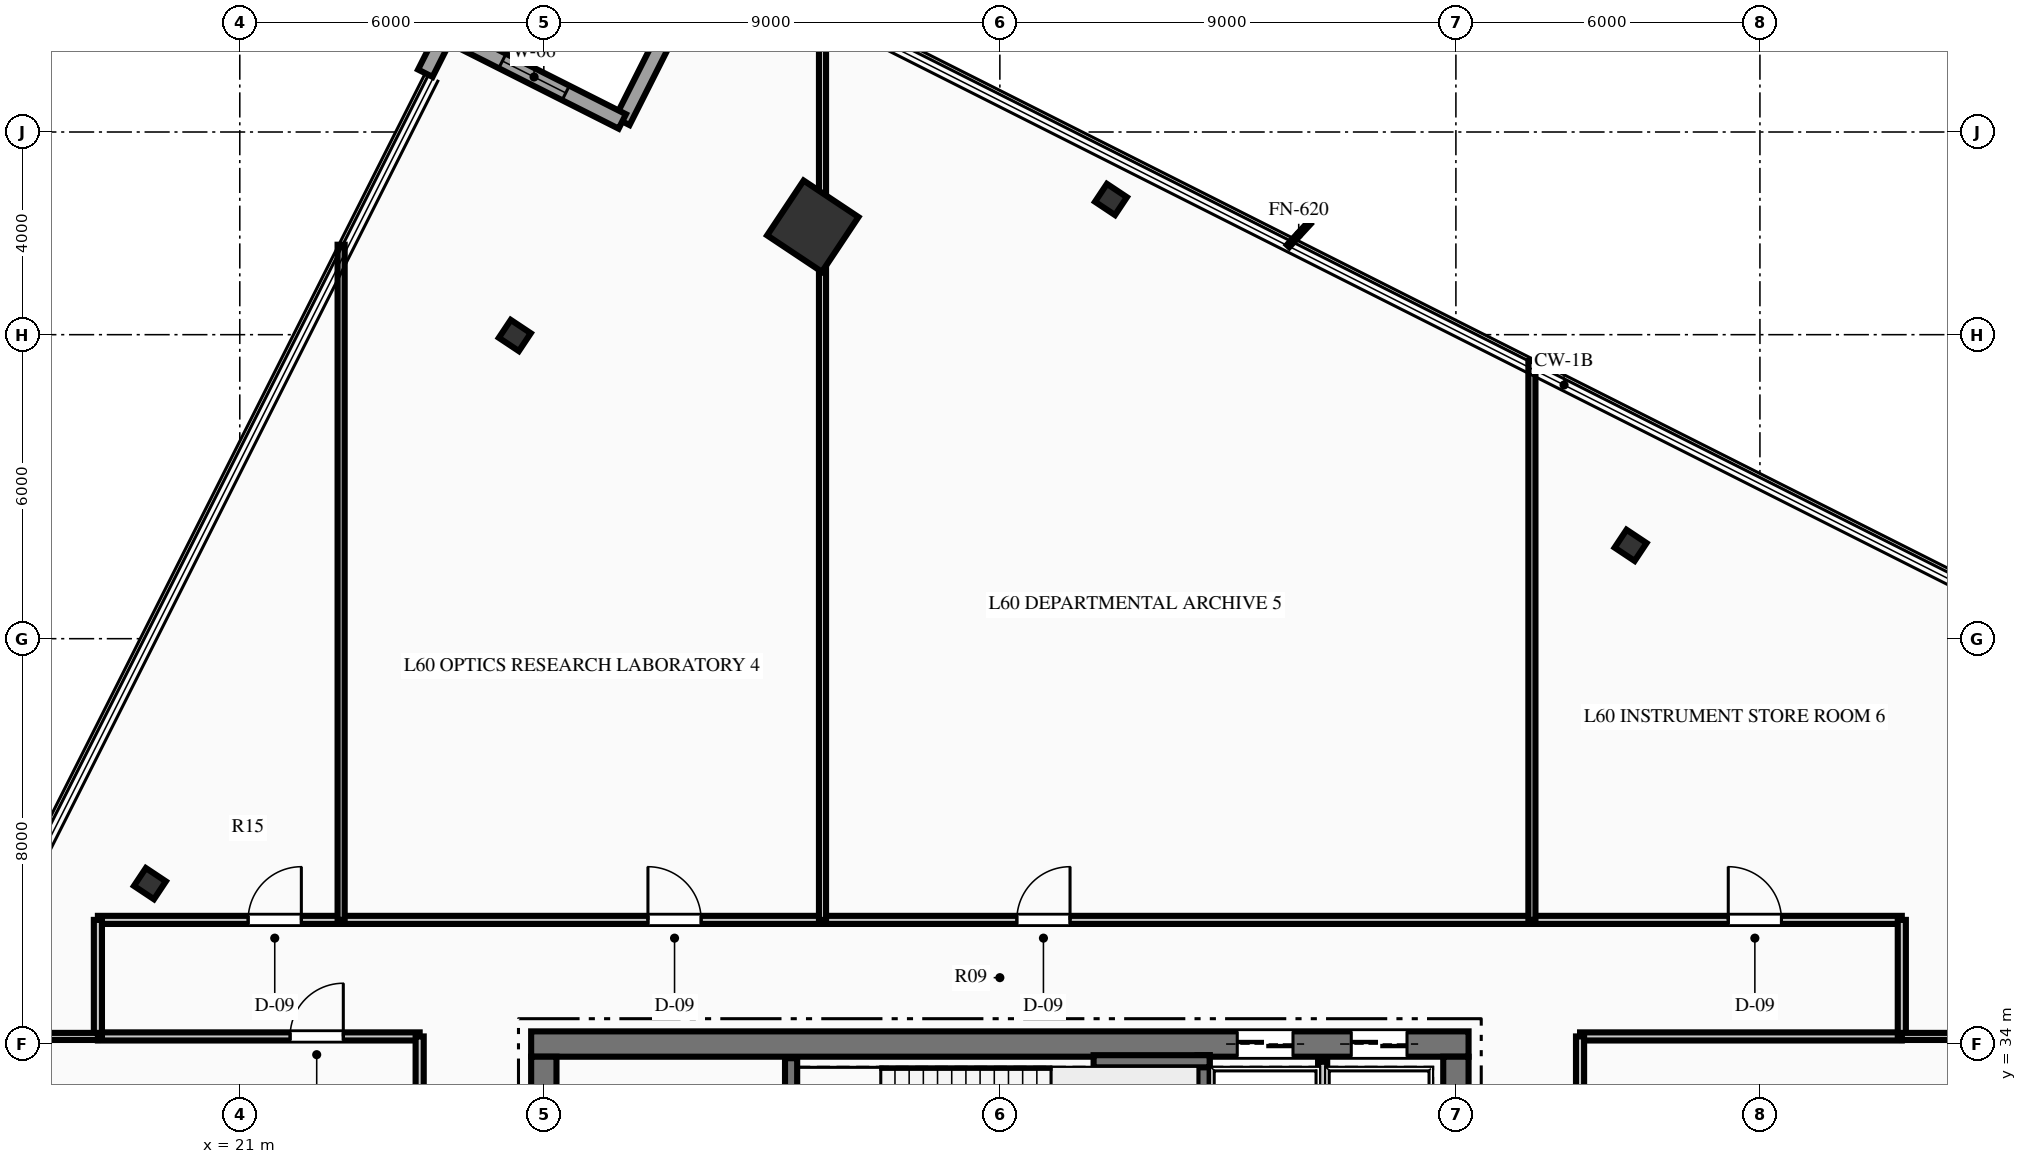
"""IFC4 building model, lengths in metres.
Left out: names, types, materials, properties, quantities, classifications, styles, units other than length and angle.
Written with IfcOpenShell. Run it as: python <this file> out.ifc"""

import sys

from ifc_helpers import new_model, si_unit, direction, frame, frame_2d, origin, origin_2d, place, context, subcontext, project, spatial, rectangle, hollow_rectangle, i_section, extrude, element, fill, save


model = new_model("IFC4")
c1 = context("Model", 3, precision=1e-05, world=origin(), true_north=direction((0.0, 1.0)))
c2 = subcontext(c1, "Body", "Model", "MODEL_VIEW")
j1 = project(units=[si_unit("LENGTHUNIT", "METRE"), si_unit("PLANEANGLEUNIT", "RADIAN")], contexts=[c1])
p1 = place(None, origin())
s1 = spatial("IfcSite", under=j1, at=p1, CompositionType="ELEMENT")
p2 = place(p1, origin())
s2 = spatial("IfcBuilding", under=s1, at=p2, CompositionType="ELEMENT")
p3 = place(p2, frame((0.0, 0.0, 239.7)))
s3 = spatial("IfcBuildingStorey", under=s2, at=p3, CompositionType="ELEMENT", Elevation=239.7)
p4 = place(p3, frame((26.75, 34.0, 0.0), z_axis=(0.0, 0.0, 1.0), x_axis=(1.0, 0.0, 0.0)))
e1 = element("IfcWall", 1, at=p4, inside=s3, PredefinedType="SHEAR", context=c2, shape_type="SweptSolid", body=[
    extrude(rectangle(XDim=18.5, YDim=0.5, at=frame_2d((9.25, 0.0))), origin(), (0.0, 0.0, 1.0), 4.5),
])
p5 = place(p4, frame((13.935, 0.0, 0.0)))
e2 = element("IfcOpeningElement", 2, at=p5, cuts=e1, PredefinedType="OPENING", context=c2, shape_type="SweptSolid", body=[
    extrude(rectangle(XDim=1.1, YDim=2.15, at=frame_2d((0.55, 1.075))), frame((0.0, 0.26, 0.0), z_axis=(0.0, -1.0, 0.0), x_axis=(1.0, 0.0, 0.0)), (0.0, 0.0, 1.0), 0.52),
])
p6 = place(p4, frame((16.185, 0.0, 0.0)))
e3 = element("IfcOpeningElement", 3, at=p6, cuts=e1, PredefinedType="OPENING", context=c2, shape_type="SweptSolid", body=[
    extrude(rectangle(XDim=1.1, YDim=2.15, at=frame_2d((0.55, 1.075))), frame((0.0, 0.26, 0.0), z_axis=(0.0, -1.0, 0.0), x_axis=(1.0, 0.0, 0.0)), (0.0, 0.0, 1.0), 0.52),
])
p7 = place(p3, frame((27.0, 18.25, 0.0), z_axis=(0.0, 0.0, 1.0), x_axis=(0.0, 1.0, 0.0)))
e4 = element("IfcWall", 4, at=p7, inside=s3, PredefinedType="SHEAR", context=c2, shape_type="SweptSolid", body=[
    extrude(rectangle(XDim=15.5, YDim=0.5, at=frame_2d((7.75, 0.0))), origin(), (0.0, 0.0, 1.0), 4.5),
])
p8 = place(p7, frame((9.99, 0.0, 0.0)))
e5 = element("IfcOpeningElement", 5, at=p8, cuts=e4, PredefinedType="OPENING", context=c2, shape_type="SweptSolid", body=[
    extrude(rectangle(XDim=1.4, YDim=2.2, at=frame_2d((0.7, 1.1))), frame((0.0, 0.26, 0.0), z_axis=(0.0, -1.0, 0.0), x_axis=(1.0, 0.0, 0.0)), (0.0, 0.0, 1.0), 0.52),
])
p9 = place(p3, frame((45.0, 18.25, 0.0), z_axis=(0.0, 0.0, 1.0), x_axis=(0.0, 1.0, 0.0)))
e6 = element("IfcWall", 6, at=p9, inside=s3, PredefinedType="SHEAR", context=c2, shape_type="SweptSolid", body=[
    extrude(rectangle(XDim=15.5, YDim=0.5, at=frame_2d((7.75, 0.0))), origin(), (0.0, 0.0, 1.0), 4.5),
])
p10 = place(p9, frame((9.99, 0.0, 0.0)))
e7 = element("IfcOpeningElement", 7, at=p10, cuts=e6, PredefinedType="OPENING", context=c2, shape_type="SweptSolid", body=[
    extrude(rectangle(XDim=1.4, YDim=2.2, at=frame_2d((0.7, 1.1))), frame((0.0, 0.26, 0.0), z_axis=(0.0, -1.0, 0.0), x_axis=(1.0, 0.0, 0.0)), (0.0, 0.0, 1.0), 0.52),
])
p11 = place(p3, frame((31.88, 29.93, 0.0), z_axis=(0.0, 0.0, 1.0), x_axis=(0.0, 1.0, 0.0)))
e8 = element("IfcWall", 8, at=p11, inside=s3, PredefinedType="SHEAR", context=c2, shape_type="SweptSolid", body=[
    extrude(rectangle(XDim=3.79, YDim=0.24, at=frame_2d((1.895, 0.0))), origin(), (0.0, 0.0, 1.0), 4.5),
])
p12 = place(p3, frame((40.02, 29.93, 0.0), z_axis=(0.0, 0.0, 1.0), x_axis=(0.0, 1.0, 0.0)))
e9 = element("IfcWall", 9, at=p12, inside=s3, PredefinedType="SHEAR", context=c2, shape_type="SweptSolid", body=[
    extrude(rectangle(XDim=3.85, YDim=0.24, at=frame_2d((1.925, 0.0))), origin(), (0.0, 0.0, 1.0), 4.5),
])
p13 = place(p3, frame((37.85, 33.66, 0.0), z_axis=(0.0, 0.0, 1.0), x_axis=(1.0, 0.0, 0.0)))
e10 = element("IfcWall", 10, at=p13, inside=s3, PredefinedType="SHEAR", context=c2, shape_type="SweptSolid", body=[
    extrude(rectangle(XDim=2.29, YDim=0.24, at=frame_2d((1.145, 0.0))), origin(), (0.0, 0.0, 1.0), 4.5),
])
p14 = place(p3, frame((32.308, 50.141, 0.0), z_axis=(0.0, 0.0, 1.0), x_axis=(0.554118199338, 0.832437998389, 0.0)))
e11 = element("IfcColumn", 11, at=p14, inside=s3, PredefinedType="COLUMN", context=c2, shape_type="SweptSolid", body=[
    extrude(hollow_rectangle(XDim=1.3, YDim=1.3, WallThickness=0.06, at=origin_2d()), origin(), (0.0, 0.0, 1.0), 4.5),
])
for number, where, z_axis, x_axis in (
    (12, (48.448, 43.842, 0.0), (0.0, 0.0, 1.0), (0.554, 0.832, 0.0)),
    (13, (38.193, 50.668, 0.0), (0.0, 0.0, 1.0), (0.554, 0.832, 0.0)),
    (14, (26.428, 47.984, 0.0), (0.0, 0.0, 1.0), (0.554, 0.832, 0.0)),
    (15, (19.226, 37.166, 0.0), (0.0, 0.0, 1.0), (0.554, 0.832, 0.0)),
):
    element("IfcColumn", number, at=place(p3, frame(where, z_axis=z_axis, x_axis=x_axis)), inside=s3, PredefinedType="COLUMN", context=c2, shape_type="SweptSolid", body=[
        extrude(i_section(OverallWidth=0.424, OverallDepth=0.474, WebThickness=0.048, FlangeThickness=0.077, at=origin_2d()), origin(), (0.0, 0.0, 1.0), 4.5),
    ])
p15 = place(p3, frame((28.549, 52.208, 0.0), z_axis=(0.0, 0.0, 1.0), x_axis=(0.450090857711, 0.892982765682, 0.0)))
e16 = element("IfcWall", 16, at=p15, inside=s3, PredefinedType="STANDARD", context=c2, shape_type="SweptSolid", body=[
    extrude(rectangle(XDim=3.9, YDim=0.32, at=frame_2d((1.95, 0.0))), origin(), (0.0, 0.0, 1.0), 4.1),
])
p16 = place(p3, frame((25.066, 53.964, 0.0), z_axis=(0.0, 0.0, 1.0), x_axis=(0.892982765682, -0.450090857711, 0.0)))
e17 = element("IfcWall", 17, at=p16, inside=s3, PredefinedType="STANDARD", context=c2, shape_type="SweptSolid", body=[
    extrude(rectangle(XDim=3.9, YDim=0.32, at=frame_2d((1.95, 0.0))), origin(), (0.0, 0.0, 1.0), 4.1),
])
p17 = place(p16, frame((1.25, 0.0, 0.85)))
e18 = element("IfcOpeningElement", 18, at=p17, cuts=e17, PredefinedType="OPENING", context=c2, shape_type="SweptSolid", body=[
    extrude(rectangle(XDim=1.4, YDim=2.0, at=frame_2d((0.7, 1.0))), frame((0.0, 0.17, 0.0), z_axis=(0.0, -1.0, 0.0), x_axis=(1.0, 0.0, 0.0)), (0.0, 0.0, 1.0), 0.34),
])
p18 = place(p3, frame((24.661, 53.16, 0.0), z_axis=(0.0, 0.0, 1.0), x_axis=(0.450032551421, 0.893012151464, 0.0)))
e19 = element("IfcWall", 19, at=p18, inside=s3, PredefinedType="STANDARD", context=c2, shape_type="SweptSolid", body=[
    extrude(rectangle(XDim=0.9, YDim=0.32, at=frame_2d((0.45, 0.0))), origin(), (0.0, 0.0, 1.0), 4.1),
])
p19 = place(p3, frame((42.37, 29.9, 0.0), z_axis=(0.0, 0.0, 1.0), x_axis=(0.0, 1.0, 0.0)))
e20 = element("IfcWall", 20, at=p19, inside=s3, PredefinedType="PARTITIONING", context=c2, shape_type="SweptSolid", body=[
    extrude(rectangle(XDim=3.75, YDim=0.18, at=frame_2d((1.875, 0.0))), origin(), (0.0, 0.0, 1.0), 4.1),
])
p20 = place(p3, frame((18.2, 36.45, 0.0), z_axis=(0.0, 0.0, 1.0), x_axis=(1.0, 0.0, 0.0)))
e21 = element("IfcWall", 21, at=p20, inside=s3, PredefinedType="PARTITIONING", context=c2, shape_type="SweptSolid", body=[
    extrude(rectangle(XDim=35.6, YDim=0.16, at=frame_2d((17.8, 0.0))), origin(), (0.0, 0.0, 1.0), 2.595),
])
p21 = place(p20, frame((2.965, 0.0, 0.0)))
e22 = element("IfcOpeningElement", 22, at=p21, cuts=e21, PredefinedType="OPENING", context=c2, shape_type="SweptSolid", body=[
    extrude(rectangle(XDim=1.05, YDim=2.15, at=frame_2d((0.525, 1.075))), frame((0.0, 0.09, 0.0), z_axis=(0.0, -1.0, 0.0), x_axis=(1.0, 0.0, 0.0)), (0.0, 0.0, 1.0), 0.18),
])
p22 = place(p20, frame((10.855, 0.0, 0.0)))
e23 = element("IfcOpeningElement", 23, at=p22, cuts=e21, PredefinedType="OPENING", context=c2, shape_type="SweptSolid", body=[
    extrude(rectangle(XDim=1.05, YDim=2.15, at=frame_2d((0.525, 1.075))), frame((0.0, 0.09, 0.0), z_axis=(0.0, -1.0, 0.0), x_axis=(1.0, 0.0, 0.0)), (0.0, 0.0, 1.0), 0.18),
])
p23 = place(p20, frame((18.135, 0.0, 0.0)))
e24 = element("IfcOpeningElement", 24, at=p23, cuts=e21, PredefinedType="OPENING", context=c2, shape_type="SweptSolid", body=[
    extrude(rectangle(XDim=1.05, YDim=2.15, at=frame_2d((0.525, 1.075))), frame((0.0, 0.09, 0.0), z_axis=(0.0, -1.0, 0.0), x_axis=(1.0, 0.0, 0.0)), (0.0, 0.0, 1.0), 0.18),
])
p24 = place(p20, frame((32.175, 0.0, 0.0)))
e25 = element("IfcOpeningElement", 25, at=p24, cuts=e21, PredefinedType="OPENING", context=c2, shape_type="SweptSolid", body=[
    extrude(rectangle(XDim=1.05, YDim=2.15, at=frame_2d((0.525, 1.075))), frame((0.0, 0.09, 0.0), z_axis=(0.0, -1.0, 0.0), x_axis=(1.0, 0.0, 0.0)), (0.0, 0.0, 1.0), 0.18),
])
p25 = place(p3, frame((18.2, 34.15, 0.0), z_axis=(0.0, 0.0, 1.0), x_axis=(1.0, 0.0, 0.0)))
e26 = element("IfcWall", 26, at=p25, inside=s3, PredefinedType="PARTITIONING", context=c2, shape_type="SweptSolid", body=[
    extrude(rectangle(XDim=6.35, YDim=0.16, at=frame_2d((3.175, 0.0))), origin(), (0.0, 0.0, 1.0), 4.1),
])
p26 = place(p25, frame((3.793, 0.0, 0.0)))
e27 = element("IfcOpeningElement", 27, at=p26, cuts=e26, PredefinedType="OPENING", context=c2, shape_type="SweptSolid", body=[
    extrude(rectangle(XDim=1.05, YDim=2.15, at=frame_2d((0.525, 1.075))), frame((0.0, 0.09, 0.0), z_axis=(0.0, -1.0, 0.0), x_axis=(1.0, 0.0, 0.0)), (0.0, 0.0, 1.0), 0.18),
])
p27 = place(p3, frame((47.45, 34.15, 0.0), z_axis=(0.0, 0.0, 1.0), x_axis=(1.0, 0.0, 0.0)))
e28 = element("IfcWall", 28, at=p27, inside=s3, PredefinedType="PARTITIONING", context=c2, shape_type="SweptSolid", body=[
    extrude(rectangle(XDim=6.35, YDim=0.16, at=frame_2d((3.175, 0.0))), origin(), (0.0, 0.0, 1.0), 2.595),
])
p28 = place(p3, frame((24.55, 17.85, 0.0), z_axis=(0.0, 0.0, 1.0), x_axis=(0.0, 1.0, 0.0)))
e29 = element("IfcWall", 29, at=p28, inside=s3, PredefinedType="PARTITIONING", context=c2, shape_type="SweptSolid", body=[
    extrude(rectangle(XDim=16.3, YDim=0.16, at=frame_2d((8.15, 0.0))), origin(), (0.0, 0.0, 1.0), 4.1),
])
p29 = place(p28, frame((6.149, 0.0, 0.0)))
e30 = element("IfcOpeningElement", 30, at=p29, cuts=e29, PredefinedType="OPENING", context=c2, shape_type="SweptSolid", body=[
    extrude(rectangle(XDim=1.05, YDim=2.15, at=frame_2d((0.525, 1.075))), frame((0.0, 0.09, 0.0), z_axis=(0.0, -1.0, 0.0), x_axis=(1.0, 0.0, 0.0)), (0.0, 0.0, 1.0), 0.18),
])
p30 = place(p3, frame((47.45, 27.25, 0.0), z_axis=(0.0, 0.0, 1.0), x_axis=(0.0, 1.0, 0.0)))
e31 = element("IfcWall", 31, at=p30, inside=s3, PredefinedType="PARTITIONING", context=c2, shape_type="SweptSolid", body=[
    extrude(rectangle(XDim=6.9, YDim=0.16, at=frame_2d((3.45, 0.0))), origin(), (0.0, 0.0, 1.0), 4.1),
])
p31 = place(p30, frame((1.683, 0.0, 0.0)))
e32 = element("IfcOpeningElement", 32, at=p31, cuts=e31, PredefinedType="OPENING", context=c2, shape_type="SweptSolid", body=[
    extrude(rectangle(XDim=1.05, YDim=2.15, at=frame_2d((0.525, 1.075))), frame((0.0, 0.09, 0.0), z_axis=(0.0, -1.0, 0.0), x_axis=(1.0, 0.0, 0.0)), (0.0, 0.0, 1.0), 0.18),
])
for number, where, z_axis, x_axis in (
    (33, (18.2, 34.15, 0.0), (0.0, 0.0, 1.0), (0.0, 1.0, 0.0)),
    (34, (53.8, 34.15, 0.0), (0.0, 0.0, 1.0), (0.0, 1.0, 0.0)),
):
    element("IfcWall", number, at=place(p3, frame(where, z_axis=z_axis, x_axis=x_axis)), inside=s3, PredefinedType="PARTITIONING", context=c2, shape_type="SweptSolid", body=[
        extrude(rectangle(XDim=2.3, YDim=0.16, at=frame_2d((1.15, 0.0))), origin(), (0.0, 0.0, 1.0), 4.1),
    ])
p32 = place(p3, frame((15.124, 34.15, 0.0), z_axis=(0.0, 0.0, 1.0), x_axis=(1.0, 0.0, 0.0)))
e35 = element("IfcWall", 35, at=p32, inside=s3, PredefinedType="PARTITIONING", context=c2, shape_type="SweptSolid", body=[
    extrude(rectangle(XDim=3.076, YDim=0.14, at=frame_2d((1.538, 0.0))), origin(), (0.0, 0.0, 1.0), 4.1),
])
p33 = place(p3, frame((53.8, 34.15, 0.0), z_axis=(0.0, 0.0, 1.0), x_axis=(1.0, 0.0, 0.0)))
e36 = element("IfcWall", 36, at=p33, inside=s3, PredefinedType="PARTITIONING", context=c2, shape_type="SweptSolid", body=[
    extrude(rectangle(XDim=10.488, YDim=0.14, at=frame_2d((5.244, 0.0))), origin(), (0.0, 0.0, 1.0), 4.1),
])
p34 = place(p3, frame((23.0, 36.45, 0.0), z_axis=(0.0, 0.0, 1.0), x_axis=(0.0, 1.0, 0.0)))
e37 = element("IfcWall", 37, at=p34, inside=s3, PredefinedType="PARTITIONING", context=c2, shape_type="SweptSolid", body=[
    extrude(rectangle(XDim=13.325, YDim=0.14, at=frame_2d((6.663, 0.0))), origin(), (0.0, 0.0, 1.0), 4.1),
])
p35 = place(p3, frame((32.5, 36.45, 0.0), z_axis=(0.0, 0.0, 1.0), x_axis=(0.0, 1.0, 0.0)))
e38 = element("IfcWall", 38, at=p35, inside=s3, PredefinedType="PARTITIONING", context=c2, shape_type="SweptSolid", body=[
    extrude(rectangle(XDim=18.09, YDim=0.14, at=frame_2d((9.045, 0.0))), origin(), (0.0, 0.0, 1.0), 2.595),
])
p36 = place(p3, frame((46.5, 36.45, 0.0), z_axis=(0.0, 0.0, 1.0), x_axis=(0.0, 1.0, 0.0)))
e39 = element("IfcWall", 39, at=p36, inside=s3, PredefinedType="PARTITIONING", context=c2, shape_type="SweptSolid", body=[
    extrude(rectangle(XDim=11.033, YDim=0.14, at=frame_2d((5.517, 0.0))), origin(), (0.0, 0.0, 1.0), 4.1),
])
p37 = place(p17, origin())
e40 = element("IfcWindow", 40, at=p37, inside=s3, PartitioningType="SINGLE_PANEL", PredefinedType="WINDOW", context=c2, shape_type="SweptSolid", body=[
    extrude(rectangle(XDim=1.4, YDim=2.0, at=frame_2d((0.7, 1.0))), frame((0.0, 0.03, 0.0), z_axis=(0.0, -1.0, 0.0), x_axis=(1.0, 0.0, 0.0)), (0.0, 0.0, 1.0), 0.06),
])
fill(e18, e40)
p38 = place(p21, origin())
e41 = element("IfcDoor", 41, at=p38, inside=s3, OperationType="SINGLE_SWING_RIGHT", PredefinedType="DOOR", context=c2, shape_type="SweptSolid", body=[
    extrude(rectangle(XDim=1.05, YDim=2.15, at=frame_2d((0.525, 1.075))), frame((0.0, 0.025, 0.0), z_axis=(0.0, -1.0, 0.0), x_axis=(1.0, 0.0, 0.0)), (0.0, 0.0, 1.0), 0.05),
])
fill(e22, e41)
p39 = place(p22, origin())
e42 = element("IfcDoor", 42, at=p39, inside=s3, OperationType="SINGLE_SWING_LEFT", PredefinedType="DOOR", context=c2, shape_type="SweptSolid", body=[
    extrude(rectangle(XDim=1.05, YDim=2.15, at=frame_2d((0.525, 1.075))), frame((0.0, 0.025, 0.0), z_axis=(0.0, -1.0, 0.0), x_axis=(1.0, 0.0, 0.0)), (0.0, 0.0, 1.0), 0.05),
])
fill(e23, e42)
p40 = place(p23, origin())
e43 = element("IfcDoor", 43, at=p40, inside=s3, OperationType="SINGLE_SWING_RIGHT", PredefinedType="DOOR", context=c2, shape_type="SweptSolid", body=[
    extrude(rectangle(XDim=1.05, YDim=2.15, at=frame_2d((0.525, 1.075))), frame((0.0, 0.025, 0.0), z_axis=(0.0, -1.0, 0.0), x_axis=(1.0, 0.0, 0.0)), (0.0, 0.0, 1.0), 0.05),
])
fill(e24, e43)
p41 = place(p24, origin())
e44 = element("IfcDoor", 44, at=p41, inside=s3, OperationType="SINGLE_SWING_LEFT", PredefinedType="DOOR", context=c2, shape_type="SweptSolid", body=[
    extrude(rectangle(XDim=1.05, YDim=2.15, at=frame_2d((0.525, 1.075))), frame((0.0, 0.025, 0.0), z_axis=(0.0, -1.0, 0.0), x_axis=(1.0, 0.0, 0.0)), (0.0, 0.0, 1.0), 0.05),
])
fill(e25, e44)
p42 = place(p26, origin())
e45 = element("IfcDoor", 45, at=p42, inside=s3, OperationType="SINGLE_SWING_RIGHT", PredefinedType="DOOR", context=c2, shape_type="SweptSolid", body=[
    extrude(rectangle(XDim=1.05, YDim=2.15, at=frame_2d((0.525, 1.075))), frame((0.0, 0.025, 0.0), z_axis=(0.0, -1.0, 0.0), x_axis=(1.0, 0.0, 0.0)), (0.0, 0.0, 1.0), 0.05),
])
fill(e27, e45)
p43 = place(p5, origin())
e46 = element("IfcDoor", 46, at=p43, inside=s3, OperationType="SLIDING_TO_LEFT", PredefinedType="DOOR", context=c2, shape_type="SweptSolid", body=[
    extrude(rectangle(XDim=1.1, YDim=2.15, at=frame_2d((0.55, 1.075))), frame((0.0, 0.025, 0.0), z_axis=(0.0, -1.0, 0.0), x_axis=(1.0, 0.0, 0.0)), (0.0, 0.0, 1.0), 0.05),
])
fill(e2, e46)
p44 = place(p6, origin())
e47 = element("IfcDoor", 47, at=p44, inside=s3, OperationType="SLIDING_TO_LEFT", PredefinedType="DOOR", context=c2, shape_type="SweptSolid", body=[
    extrude(rectangle(XDim=1.1, YDim=2.15, at=frame_2d((0.55, 1.075))), frame((0.0, 0.025, 0.0), z_axis=(0.0, -1.0, 0.0), x_axis=(1.0, 0.0, 0.0)), (0.0, 0.0, 1.0), 0.05),
])
fill(e3, e47)
save(model, sys.argv[1])
